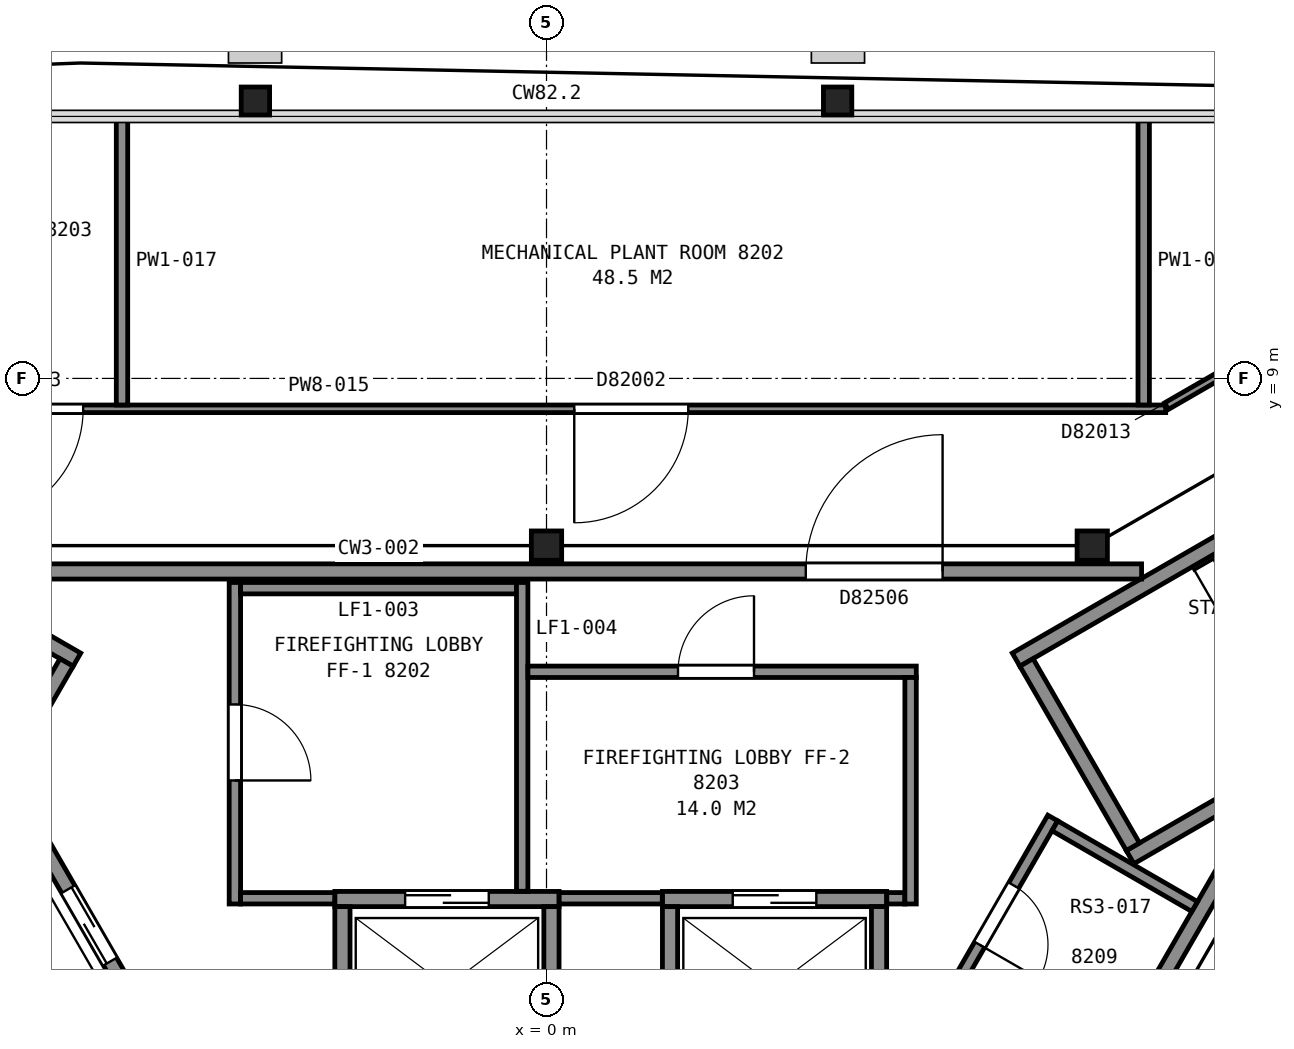
"""IFC4 building model, lengths in metres.
Left out: names, types, materials, properties, quantities, classifications, styles, units other than length and angle.
Written with IfcOpenShell. Run it as: python <this file> out.ifc"""

import sys

from ifc_helpers import new_model, si_unit, direction, frame, frame_2d, origin, origin_2d, place, context, subcontext, project, spatial, rectangle, i_section, extrude, element, fill, save


model = new_model("IFC4")
c1 = context("Model", 3, precision=1e-05, world=origin(), true_north=direction((0.0, 1.0)))
c2 = subcontext(c1, "Body", "Model", "MODEL_VIEW")
j1 = project(units=[si_unit("LENGTHUNIT", "METRE"), si_unit("PLANEANGLEUNIT", "RADIAN")], contexts=[c1])
p1 = place(None, origin())
s1 = spatial("IfcSite", under=j1, at=p1, CompositionType="ELEMENT")
p2 = place(p1, origin())
s2 = spatial("IfcBuilding", under=s1, at=p2, CompositionType="ELEMENT")
p3 = place(p2, frame((0.0, 0.0, 325.2)))
s3 = spatial("IfcBuildingStorey", under=s2, at=p3, CompositionType="ELEMENT", Elevation=325.2)
for number, where, z_axis, x_axis in (
    (1, (3.83, 12.65, 0.0), (0.0, 0.0, 1.0), (1.0, 0.0, 0.0)),
    (2, (-3.83, 12.65, 0.0), (0.0, 0.0, 1.0), (1.0, 0.0, 0.0)),
):
    element("IfcColumn", number, at=place(p3, frame(where, z_axis=z_axis, x_axis=x_axis)), inside=s3, PredefinedType="COLUMN", context=c2, shape_type="SweptSolid", body=[
        extrude(i_section(OverallWidth=0.373, OverallDepth=0.368, WebThickness=0.015, FlangeThickness=0.024, FilletRadius=0.015, at=origin_2d()), origin(), (0.0, 0.0, 1.0), 4.2),
    ])
for number, where, z_axis, x_axis in (
    (3, (7.18, 6.8, 0.0), (0.0, 0.0, 1.0), (1.0, 0.0, 0.0)),
    (4, (0.0, 6.8, 0.0), (0.0, 0.0, 1.0), (1.0, 0.0, 0.0)),
):
    element("IfcColumn", number, at=place(p3, frame(where, z_axis=z_axis, x_axis=x_axis)), inside=s3, PredefinedType="COLUMN", context=c2, shape_type="SweptSolid", body=[
        extrude(i_section(OverallWidth=0.399, OverallDepth=0.386, WebThickness=0.021, FlangeThickness=0.033, FilletRadius=0.015, at=origin_2d()), origin(), (0.0, 0.0, 1.0), 4.2),
    ])
for number, where, z_axis, x_axis in (
    (5, (6.178, 5.299, 0.0), (0.0, 0.0, 1.0), (0.866, 0.5, 0.0)),
    (6, (7.678, 2.701, 0.0), (0.0, 0.0, 1.0), (0.866, 0.5, 0.0)),
):
    element("IfcWall", number, at=place(p3, frame(where, z_axis=z_axis, x_axis=x_axis)), inside=s3, PredefinedType="PARTITIONING", context=c2, shape_type="SweptSolid", body=[
        extrude(rectangle(XDim=7.2, YDim=0.2, at=frame_2d((3.6, 0.0))), origin(), (0.0, 0.0, 1.0), 3.95),
    ])
p4 = place(p3, frame((7.715, 2.838, 0.0), z_axis=(0.0, 0.0, 1.0), x_axis=(-0.500049511043, 0.865996816683, 0.0)))
e7 = element("IfcWall", 7, at=p4, inside=s3, PredefinedType="PARTITIONING", context=c2, shape_type="SweptSolid", body=[
    extrude(rectangle(XDim=2.8, YDim=0.2, at=frame_2d((1.4, 0.0))), origin(), (0.0, 0.0, 1.0), 3.95),
])
p5 = place(p3, frame((-6.178, 5.299, 0.0), z_axis=(0.0, 0.0, 1.0), x_axis=(-0.866033125095, 0.499986626058, 0.0)))
e8 = element("IfcWall", 8, at=p5, inside=s3, PredefinedType="PARTITIONING", context=c2, shape_type="SweptSolid", body=[
    extrude(rectangle(XDim=7.2, YDim=0.2, at=frame_2d((3.6, 0.0))), origin(), (0.0, 0.0, 1.0), 3.95),
])
p6 = place(p3, frame((-6.315, 5.262, 0.0), z_axis=(0.0, 0.0, 1.0), x_axis=(-0.500049511043, -0.865996816683, 0.0)))
e9 = element("IfcWall", 9, at=p6, inside=s3, PredefinedType="PARTITIONING", context=c2, shape_type="SweptSolid", body=[
    extrude(rectangle(XDim=2.8, YDim=0.2, at=frame_2d((1.4, 0.0))), origin(), (0.0, 0.0, 1.0), 3.95),
])
p7 = place(p3, frame((-2.785, 2.15, 0.0), z_axis=(0.0, 0.0, 1.0), x_axis=(1.0, 0.0, 0.0)))
e10 = element("IfcWall", 10, at=p7, inside=s3, PredefinedType="PARTITIONING", context=c2, shape_type="SweptSolid", body=[
    extrude(rectangle(XDim=2.95, YDim=0.2, at=frame_2d((1.475, 0.0))), origin(), (0.0, 0.0, 1.0), 4.2),
])
p8 = place(p7, frame((0.925, 0.0, 0.0)))
e11 = element("IfcOpeningElement", 11, at=p8, cuts=e10, PredefinedType="OPENING", context=c2, shape_type="SweptSolid", body=[
    extrude(rectangle(XDim=1.1, YDim=2.1, at=frame_2d((0.55, 1.05))), frame((0.0, 0.11, 0.0), z_axis=(0.0, -1.0, 0.0), x_axis=(1.0, 0.0, 0.0)), (0.0, 0.0, 1.0), 0.22),
])
p9 = place(p3, frame((1.525, 2.15, 0.0), z_axis=(0.0, 0.0, 1.0), x_axis=(1.0, 0.0, 0.0)))
e12 = element("IfcWall", 12, at=p9, inside=s3, PredefinedType="PARTITIONING", context=c2, shape_type="SweptSolid", body=[
    extrude(rectangle(XDim=2.95, YDim=0.2, at=frame_2d((1.475, 0.0))), origin(), (0.0, 0.0, 1.0), 4.2),
])
p10 = place(p9, frame((0.925, 0.0, 0.0)))
e13 = element("IfcOpeningElement", 13, at=p10, cuts=e12, PredefinedType="OPENING", context=c2, shape_type="SweptSolid", body=[
    extrude(rectangle(XDim=1.1, YDim=2.1, at=frame_2d((0.55, 1.05))), frame((0.0, 0.11, 0.0), z_axis=(0.0, -1.0, 0.0), x_axis=(1.0, 0.0, 0.0)), (0.0, 0.0, 1.0), 0.22),
])
for number, where, z_axis, x_axis in (
    (14, (4.375, 0.1, 0.0), (0.0, 0.0, 1.0), (0.0, 1.0, 0.0)),
    (15, (1.625, 0.1, 0.0), (0.0, 0.0, 1.0), (0.0, 1.0, 0.0)),
    (16, (0.065, 0.1, 0.0), (0.0, 0.0, 1.0), (0.0, 1.0, 0.0)),
    (17, (-2.685, 0.1, 0.0), (0.0, 0.0, 1.0), (0.0, 1.0, 0.0)),
):
    element("IfcWall", number, at=place(p3, frame(where, z_axis=z_axis, x_axis=x_axis)), inside=s3, PredefinedType="PARTITIONING", context=c2, shape_type="SweptSolid", body=[
        extrude(rectangle(XDim=1.95, YDim=0.2, at=frame_2d((0.975, 0.0))), origin(), (0.0, 0.0, 1.0), 4.2),
    ])
p11 = place(p3, frame((-5.28, 0.525, 0.0), z_axis=(0.0, 0.0, 1.0), x_axis=(-0.500037662692, 0.866003658127, 0.0)))
e18 = element("IfcWall", 18, at=p11, inside=s3, PredefinedType="PARTITIONING", context=c2, shape_type="SweptSolid", body=[
    extrude(rectangle(XDim=2.95, YDim=0.2, at=frame_2d((1.475, 0.0))), origin(), (0.0, 0.0, 1.0), 4.2),
])
p12 = place(p11, frame((0.925, 0.0, 0.0)))
e19 = element("IfcOpeningElement", 19, at=p12, cuts=e18, PredefinedType="OPENING", context=c2, shape_type="SweptSolid", body=[
    extrude(rectangle(XDim=1.1, YDim=2.1, at=frame_2d((0.55, 1.05))), frame((0.0, 0.11, 0.0), z_axis=(0.0, -1.0, 0.0), x_axis=(1.0, 0.0, 0.0)), (0.0, 0.0, 1.0), 0.22),
])
p13 = place(p3, frame((7.829, 6.46, 0.0), z_axis=(0.0, 0.0, 1.0), x_axis=(-1.0, 0.0, 0.0)))
e20 = element("IfcWall", 20, at=p13, inside=s3, PredefinedType="PARTITIONING", context=c2, shape_type="SweptSolid", body=[
    extrude(rectangle(XDim=15.658, YDim=0.2, at=frame_2d((7.829, 0.0))), origin(), (0.0, 0.0, 1.0), 3.95),
])
p14 = place(p13, frame((2.618, 0.0, 0.0)))
e21 = element("IfcOpeningElement", 21, at=p14, cuts=e20, PredefinedType="OPENING", context=c2, shape_type="SweptSolid", body=[
    extrude(rectangle(XDim=1.8, YDim=2.1, at=frame_2d((0.9, 1.05))), frame((0.0, 0.11, 0.0), z_axis=(0.0, -1.0, 0.0), x_axis=(1.0, 0.0, 0.0)), (0.0, 0.0, 1.0), 0.22),
])
p15 = place(p3, frame((-4.1, 2.085, 0.0), z_axis=(0.0, 0.0, 1.0), x_axis=(0.0, 1.0, 0.0)))
e22 = element("IfcWall", 22, at=p15, inside=s3, PredefinedType="PARTITIONING", context=c2, shape_type="SweptSolid", body=[
    extrude(rectangle(XDim=4.23, YDim=0.15, at=frame_2d((2.115, 0.0))), origin(), (0.0, 0.0, 1.0), 3.95),
])
p16 = place(p15, frame((1.625, 0.0, 0.0)))
e23 = element("IfcOpeningElement", 23, at=p16, cuts=e22, PredefinedType="OPENING", context=c2, shape_type="SweptSolid", body=[
    extrude(rectangle(XDim=1.0, YDim=2.1, at=frame_2d((0.5, 1.05))), frame((0.0, 0.085, 0.0), z_axis=(0.0, -1.0, 0.0), x_axis=(1.0, 0.0, 0.0)), (0.0, 0.0, 1.0), 0.17),
])
p17 = place(p3, frame((-4.025, 2.16, 0.0), z_axis=(0.0, 0.0, 1.0), x_axis=(1.0, 0.0, 0.0)))
e24 = element("IfcWall", 24, at=p17, inside=s3, PredefinedType="PARTITIONING", context=c2, shape_type="SweptSolid", body=[
    extrude(rectangle(XDim=1.238, YDim=0.15, at=frame_2d((0.619, 0.0))), origin(), (0.0, 0.0, 1.0), 3.95),
])
p18 = place(p3, frame((-4.025, 6.24, 0.0), z_axis=(0.0, 0.0, 1.0), x_axis=(1.0, 0.0, 0.0)))
e25 = element("IfcWall", 25, at=p18, inside=s3, PredefinedType="PARTITIONING", context=c2, shape_type="SweptSolid", body=[
    extrude(rectangle(XDim=3.63, YDim=0.15, at=frame_2d((1.815, 0.0))), origin(), (0.0, 0.0, 1.0), 3.95),
])
p19 = place(p3, frame((-0.32, 2.252, 0.0), z_axis=(0.0, 0.0, 1.0), x_axis=(0.0, 1.0, 0.0)))
e26 = element("IfcWall", 26, at=p19, inside=s3, PredefinedType="PARTITIONING", context=c2, shape_type="SweptSolid", body=[
    extrude(rectangle(XDim=4.063, YDim=0.15, at=frame_2d((2.031, 0.0))), origin(), (0.0, 0.0, 1.0), 3.95),
])
p20 = place(p3, frame((-0.245, 5.14, 0.0), z_axis=(0.0, 0.0, 1.0), x_axis=(1.0, 0.0, 0.0)))
e27 = element("IfcWall", 27, at=p20, inside=s3, PredefinedType="PARTITIONING", context=c2, shape_type="SweptSolid", body=[
    extrude(rectangle(XDim=5.11, YDim=0.15, at=frame_2d((2.555, 0.0))), origin(), (0.0, 0.0, 1.0), 3.95),
])
p21 = place(p20, frame((1.975, 0.0, 0.0)))
e28 = element("IfcOpeningElement", 28, at=p21, cuts=e27, PredefinedType="OPENING", context=c2, shape_type="SweptSolid", body=[
    extrude(rectangle(XDim=1.0, YDim=2.1, at=frame_2d((0.5, 1.05))), frame((0.0, 0.085, 0.0), z_axis=(0.0, -1.0, 0.0), x_axis=(1.0, 0.0, 0.0)), (0.0, 0.0, 1.0), 0.17),
])
p22 = place(p3, frame((0.167, 2.16, 0.0), z_axis=(0.0, 0.0, 1.0), x_axis=(1.0, 0.0, 0.0)))
e29 = element("IfcWall", 29, at=p22, inside=s3, PredefinedType="PARTITIONING", context=c2, shape_type="SweptSolid", body=[
    extrude(rectangle(XDim=1.356, YDim=0.15, at=frame_2d((0.678, 0.0))), origin(), (0.0, 0.0, 1.0), 3.95),
])
p23 = place(p3, frame((2.552, -8.5, 0.0), z_axis=(0.0, 0.0, 1.0), x_axis=(0.499981156672, 0.866036282712, 0.0)))
e30 = element("IfcWall", 30, at=p23, inside=s3, PredefinedType="PARTITIONING", context=c2, shape_type="SweptSolid", body=[
    extrude(rectangle(XDim=13.915, YDim=0.2, at=frame_2d((6.957, 0.0))), origin(), (0.0, 0.0, 1.0), 3.95),
])
p24 = place(p3, frame((4.477, 2.16, 0.0), z_axis=(0.0, 0.0, 1.0), x_axis=(1.0, 0.0, 0.0)))
e31 = element("IfcWall", 31, at=p24, inside=s3, PredefinedType="PARTITIONING", context=c2, shape_type="SweptSolid", body=[
    extrude(rectangle(XDim=0.238, YDim=0.15, at=frame_2d((0.119, 0.0))), origin(), (0.0, 0.0, 1.0), 3.95),
])
p25 = place(p3, frame((4.79, 2.085, 0.0), z_axis=(0.0, 0.0, 1.0), x_axis=(0.0, 1.0, 0.0)))
e32 = element("IfcWall", 32, at=p25, inside=s3, PredefinedType="PARTITIONING", context=c2, shape_type="SweptSolid", body=[
    extrude(rectangle(XDim=2.98, YDim=0.15, at=frame_2d((1.49, 0.0))), origin(), (0.0, 0.0, 1.0), 3.95),
])
p26 = place(p3, frame((6.66, 3.216, 0.0), z_axis=(0.0, 0.0, 1.0), x_axis=(-0.499939757307, -0.866060182126, 0.0)))
e33 = element("IfcWall", 33, at=p26, inside=s3, PredefinedType="PARTITIONING", context=c2, shape_type="SweptSolid", body=[
    extrude(rectangle(XDim=2.95, YDim=0.15, at=frame_2d((1.475, 0.0))), origin(), (0.0, 0.0, 1.0), 3.95),
])
p27 = place(p26, frame((1.025, 0.0, 0.0)))
e34 = element("IfcOpeningElement", 34, at=p27, cuts=e33, PredefinedType="OPENING", context=c2, shape_type="SweptSolid", body=[
    extrude(rectangle(XDim=0.9, YDim=2.1, at=frame_2d((0.45, 1.05))), frame((0.0, 0.085, 0.0), z_axis=(0.0, -1.0, 0.0), x_axis=(1.0, 0.0, 0.0)), (0.0, 0.0, 1.0), 0.17),
])
p28 = place(p3, frame((6.688, 3.114, 0.0), z_axis=(0.0, 0.0, 1.0), x_axis=(0.865913749133, -0.500193341681, 0.0)))
e35 = element("IfcWall", 35, at=p28, inside=s3, PredefinedType="PARTITIONING", context=c2, shape_type="SweptSolid", body=[
    extrude(rectangle(XDim=2.124, YDim=0.15, at=frame_2d((1.062, 0.0))), origin(), (0.0, 0.0, 1.0), 3.95),
])
p29 = place(p3, frame((-3.744, -10.714, 0.0), z_axis=(0.0, 0.0, 1.0), x_axis=(-0.500044034969, 0.86599997869, 0.0)))
e36 = element("IfcWall", 36, at=p29, inside=s3, PredefinedType="PARTITIONING", context=c2, shape_type="SweptSolid", body=[
    extrude(rectangle(XDim=15.553, YDim=0.1, at=frame_2d((7.776, 0.0))), origin(), (0.0, 0.0, 1.0), 3.297),
])
p30 = place(p29, frame((11.314, 0.0, 0.0)))
e37 = element("IfcOpeningElement", 37, at=p30, cuts=e36, PredefinedType="OPENING", context=c2, shape_type="SweptSolid", body=[
    extrude(rectangle(XDim=1.2, YDim=2.1, at=frame_2d((0.6, 1.05))), frame((0.0, 0.06, 0.0), z_axis=(0.0, -1.0, 0.0), x_axis=(1.0, 0.0, 0.0)), (0.0, 0.0, 1.0), 0.12),
])
p31 = place(p29, frame((4.593, 0.0, 0.0)))
e38 = element("IfcOpeningElement", 38, at=p31, cuts=e36, PredefinedType="OPENING", context=c2, shape_type="SweptSolid", body=[
    extrude(rectangle(XDim=1.2, YDim=2.1, at=frame_2d((0.6, 1.05))), frame((0.0, 0.06, 0.0), z_axis=(0.0, -1.0, 0.0), x_axis=(1.0, 0.0, 0.0)), (0.0, 0.0, 1.0), 0.12),
])
p32 = place(p3, frame((-8.146, 8.6, 0.0), z_axis=(0.0, 0.0, 1.0), x_axis=(1.0, 0.0, 0.0)))
e39 = element("IfcWall", 39, at=p32, inside=s3, PredefinedType="PARTITIONING", context=c2, shape_type="SweptSolid", body=[
    extrude(rectangle(XDim=16.292, YDim=0.1, at=frame_2d((8.146, 0.0))), origin(), (0.0, 0.0, 1.0), 3.297),
])
p33 = place(p32, frame((8.511, 0.0, 0.0)))
e40 = element("IfcOpeningElement", 40, at=p33, cuts=e39, PredefinedType="OPENING", context=c2, shape_type="SweptSolid", body=[
    extrude(rectangle(XDim=1.5, YDim=2.1, at=frame_2d((0.75, 1.05))), frame((0.0, 0.06, 0.0), z_axis=(0.0, -1.0, 0.0), x_axis=(1.0, 0.0, 0.0)), (0.0, 0.0, 1.0), 0.12),
])
p34 = place(p32, frame((0.55, 0.0, 0.0)))
e41 = element("IfcOpeningElement", 41, at=p34, cuts=e39, PredefinedType="OPENING", context=c2, shape_type="SweptSolid", body=[
    extrude(rectangle(XDim=1.5, YDim=2.1, at=frame_2d((0.75, 1.05))), frame((0.0, 0.06, 0.0), z_axis=(0.0, -1.0, 0.0), x_axis=(1.0, 0.0, 0.0)), (0.0, 0.0, 1.0), 0.12),
])
p35 = place(p3, frame((-5.585, 8.65, 0.0), z_axis=(0.0, 0.0, 1.0), x_axis=(0.0, 1.0, 0.0)))
e42 = element("IfcWall", 42, at=p35, inside=s3, PredefinedType="PARTITIONING", context=c2, shape_type="SweptSolid", body=[
    extrude(rectangle(XDim=3.783, YDim=0.15, at=frame_2d((1.892, 0.0))), origin(), (0.0, 0.0, 1.0), 3.297),
])
p36 = place(p3, frame((11.521, 2.754, 0.0), z_axis=(0.0, 0.0, 1.0), x_axis=(-0.500044034969, -0.86599997869, 0.0)))
e43 = element("IfcWall", 43, at=p36, inside=s3, PredefinedType="PARTITIONING", context=c2, shape_type="SweptSolid", body=[
    extrude(rectangle(XDim=15.553, YDim=0.1, at=frame_2d((7.776, 0.0))), origin(), (0.0, 0.0, 1.0), 3.297),
])
p37 = place(p36, frame((8.303, 0.0, 0.0)))
e44 = element("IfcOpeningElement", 44, at=p37, cuts=e43, PredefinedType="OPENING", context=c2, shape_type="SweptSolid", body=[
    extrude(rectangle(XDim=1.5, YDim=2.1, at=frame_2d((0.75, 1.05))), frame((0.0, 0.06, 0.0), z_axis=(0.0, -1.0, 0.0), x_axis=(1.0, 0.0, 0.0)), (0.0, 0.0, 1.0), 0.12),
])
p38 = place(p36, frame((0.561, 0.0, 0.0)))
e45 = element("IfcOpeningElement", 45, at=p38, cuts=e43, PredefinedType="OPENING", context=c2, shape_type="SweptSolid", body=[
    extrude(rectangle(XDim=1.5, YDim=2.1, at=frame_2d((0.75, 1.05))), frame((0.0, 0.06, 0.0), z_axis=(0.0, -1.0, 0.0), x_axis=(1.0, 0.0, 0.0)), (0.0, 0.0, 1.0), 0.12),
])
p39 = place(p3, frame((7.857, 8.65, 0.0), z_axis=(0.0, 0.0, 1.0), x_axis=(0.0, 1.0, 0.0)))
e46 = element("IfcWall", 46, at=p39, inside=s3, PredefinedType="PARTITIONING", context=c2, shape_type="SweptSolid", body=[
    extrude(rectangle(XDim=3.783, YDim=0.15, at=frame_2d((1.892, 0.0))), origin(), (0.0, 0.0, 1.0), 3.297),
])
p40 = place(p3, frame((8.157, 8.635, 0.0), z_axis=(0.0, 0.0, 1.0), x_axis=(0.866029215606, 0.499993397673, 0.0)))
e47 = element("IfcWall", 47, at=p40, inside=s3, PredefinedType="PARTITIONING", context=c2, shape_type="SweptSolid", body=[
    extrude(rectangle(XDim=4.108, YDim=0.1, at=frame_2d((2.054, 0.0))), origin(), (0.0, 0.0, 1.0), 3.297),
])
p41 = place(p40, frame((1.23, 0.0, 0.0)))
e48 = element("IfcOpeningElement", 48, at=p41, cuts=e47, PredefinedType="OPENING", context=c2, shape_type="SweptSolid", body=[
    extrude(rectangle(XDim=1.5, YDim=2.1, at=frame_2d((0.75, 1.05))), frame((0.0, 0.06, 0.0), z_axis=(0.0, -1.0, 0.0), x_axis=(1.0, 0.0, 0.0)), (0.0, 0.0, 1.0), 0.12),
])
p42 = place(p8, origin())
e49 = element("IfcDoor", 49, at=p42, inside=s3, OperationType="SLIDING_TO_LEFT", PredefinedType="DOOR", context=c2, shape_type="SweptSolid", body=[
    extrude(rectangle(XDim=1.1, YDim=2.1, at=frame_2d((0.55, 1.05))), frame((0.0, 0.025, 0.0), z_axis=(0.0, -1.0, 0.0), x_axis=(1.0, 0.0, 0.0)), (0.0, 0.0, 1.0), 0.05),
])
fill(e11, e49)
p43 = place(p10, origin())
e50 = element("IfcDoor", 50, at=p43, inside=s3, OperationType="SLIDING_TO_RIGHT", PredefinedType="DOOR", context=c2, shape_type="SweptSolid", body=[
    extrude(rectangle(XDim=1.1, YDim=2.1, at=frame_2d((0.55, 1.05))), frame((0.0, 0.025, 0.0), z_axis=(0.0, -1.0, 0.0), x_axis=(1.0, 0.0, 0.0)), (0.0, 0.0, 1.0), 0.05),
])
fill(e13, e50)
p44 = place(p12, origin())
e51 = element("IfcDoor", 51, at=p44, inside=s3, OperationType="SLIDING_TO_LEFT", PredefinedType="DOOR", context=c2, shape_type="SweptSolid", body=[
    extrude(rectangle(XDim=1.1, YDim=2.1, at=frame_2d((0.55, 1.05))), frame((0.0, 0.025, 0.0), z_axis=(0.0, -1.0, 0.0), x_axis=(1.0, 0.0, 0.0)), (0.0, 0.0, 1.0), 0.05),
])
fill(e19, e51)
p45 = place(p14, origin())
e52 = element("IfcDoor", 52, at=p45, inside=s3, OperationType="DOUBLE_DOOR_SINGLE_SWING", PredefinedType="DOOR", context=c2, shape_type="SweptSolid", body=[
    extrude(rectangle(XDim=1.8, YDim=2.1, at=frame_2d((0.9, 1.05))), frame((0.0, 0.025, 0.0), z_axis=(0.0, -1.0, 0.0), x_axis=(1.0, 0.0, 0.0)), (0.0, 0.0, 1.0), 0.05),
])
fill(e21, e52)
p46 = place(p16, origin())
e53 = element("IfcDoor", 53, at=p46, inside=s3, OperationType="SINGLE_SWING_LEFT", PredefinedType="DOOR", context=c2, shape_type="SweptSolid", body=[
    extrude(rectangle(XDim=1.0, YDim=2.1, at=frame_2d((0.5, 1.05))), frame((0.0, 0.025, 0.0), z_axis=(0.0, -1.0, 0.0), x_axis=(1.0, 0.0, 0.0)), (0.0, 0.0, 1.0), 0.05),
])
fill(e23, e53)
p47 = place(p21, origin())
e54 = element("IfcDoor", 54, at=p47, inside=s3, OperationType="SINGLE_SWING_RIGHT", PredefinedType="DOOR", context=c2, shape_type="SweptSolid", body=[
    extrude(rectangle(XDim=1.0, YDim=2.1, at=frame_2d((0.5, 1.05))), frame((0.0, 0.025, 0.0), z_axis=(0.0, -1.0, 0.0), x_axis=(1.0, 0.0, 0.0)), (0.0, 0.0, 1.0), 0.05),
])
fill(e28, e54)
p48 = place(p27, origin())
e55 = element("IfcDoor", 55, at=p48, inside=s3, OperationType="SINGLE_SWING_RIGHT", PredefinedType="DOOR", context=c2, shape_type="SweptSolid", body=[
    extrude(rectangle(XDim=0.9, YDim=2.1, at=frame_2d((0.45, 1.05))), frame((0.0, 0.025, 0.0), z_axis=(0.0, -1.0, 0.0), x_axis=(1.0, 0.0, 0.0)), (0.0, 0.0, 1.0), 0.05),
])
fill(e34, e55)
p49 = place(p33, origin())
e56 = element("IfcDoor", 56, at=p49, inside=s3, OperationType="DOUBLE_DOOR_SINGLE_SWING", PredefinedType="DOOR", context=c2, shape_type="SweptSolid", body=[
    extrude(rectangle(XDim=1.5, YDim=2.1, at=frame_2d((0.75, 1.05))), frame((0.0, 0.025, 0.0), z_axis=(0.0, -1.0, 0.0), x_axis=(1.0, 0.0, 0.0)), (0.0, 0.0, 1.0), 0.05),
])
fill(e40, e56)
p50 = place(p34, origin())
e57 = element("IfcDoor", 57, at=p50, inside=s3, OperationType="DOUBLE_DOOR_SINGLE_SWING", PredefinedType="DOOR", context=c2, shape_type="SweptSolid", body=[
    extrude(rectangle(XDim=1.5, YDim=2.1, at=frame_2d((0.75, 1.05))), frame((0.0, 0.025, 0.0), z_axis=(0.0, -1.0, 0.0), x_axis=(1.0, 0.0, 0.0)), (0.0, 0.0, 1.0), 0.05),
])
fill(e41, e57)
save(model, sys.argv[1])
